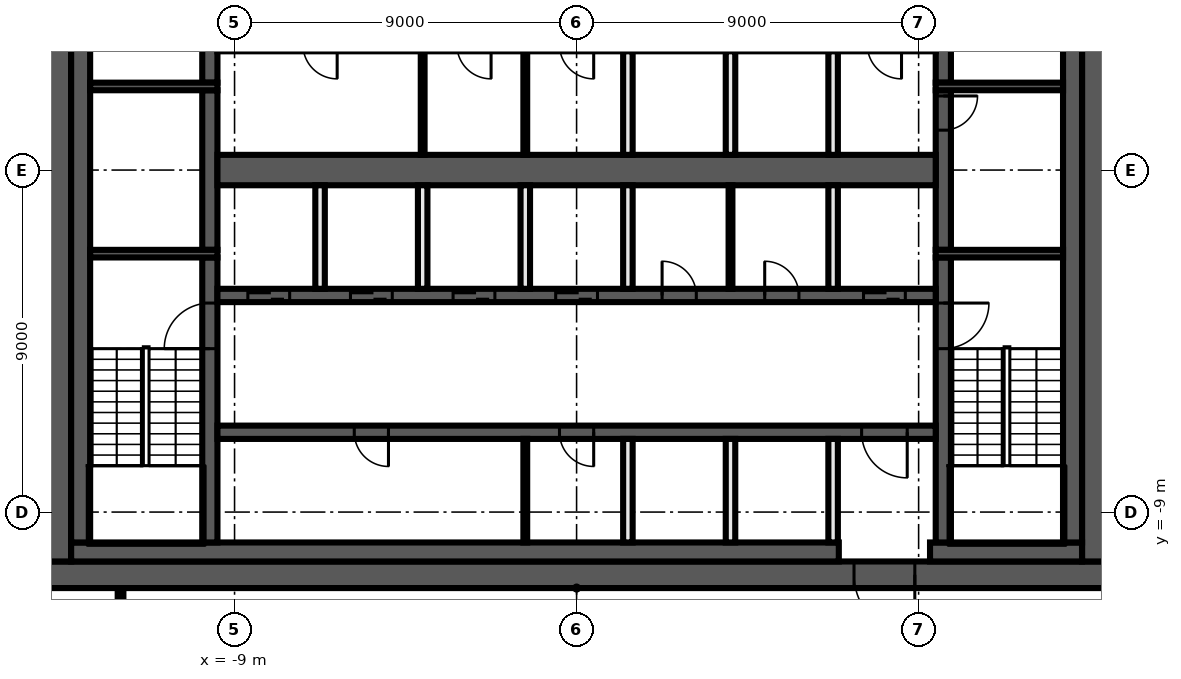
"""IFC4 building model, lengths in metres.
Left out: names, types, materials, properties, quantities, classifications, styles, units other than length and angle.
Written with IfcOpenShell. Run it as: python <this file> out.ifc"""

import sys

from ifc_helpers import new_model, si_unit, direction, frame, frame_2d, origin, place, context, subcontext, project, spatial, rectangle, extrude, element, fill, save


model = new_model("IFC4")
c1 = context("Model", 3, precision=1e-05, world=origin(), true_north=direction((0.0, 1.0)))
c2 = subcontext(c1, "Body", "Model", "MODEL_VIEW")
j1 = project(units=[si_unit("LENGTHUNIT", "METRE"), si_unit("PLANEANGLEUNIT", "RADIAN")], contexts=[c1])
p1 = place(None, origin())
s1 = spatial("IfcSite", under=j1, at=p1, CompositionType="ELEMENT")
p2 = place(p1, origin())
s2 = spatial("IfcBuilding", under=s1, at=p2, CompositionType="ELEMENT")
p3 = place(p2, frame((0.0, 0.0, 279.0)))
s3 = spatial("IfcBuildingStorey", under=s2, at=p3, CompositionType="ELEMENT", Elevation=279.0)
p4 = place(p3, frame((-12.0, -13.725, 0.0), z_axis=(0.0, 0.0, 1.0), x_axis=(0.0, 1.0, 0.0)))
e1 = element("IfcWall", 1, at=p4, inside=s3, PredefinedType="PARTITIONING", context=c2, shape_type="SweptSolid", body=[
    extrude(rectangle(XDim=2.725, YDim=0.15, at=frame_2d((1.363, 0.0))), origin(), (0.0, 0.0, 1.0), 3.6),
])
p5 = place(p3, frame((14.0, -10.65, 0.0), z_axis=(0.0, 0.0, 1.0), x_axis=(-1.0, 0.0, 0.0)))
e2 = element("IfcWall", 2, at=p5, inside=s3, PredefinedType="SHEAR", context=c2, shape_type="SweptSolid", body=[
    extrude(rectangle(XDim=28.0, YDim=0.7, at=frame_2d((14.0, 0.0))), origin(), (0.0, 0.0, 1.0), 3.6),
])
p6 = place(p5, frame((5.1, 0.0, 0.0)))
e3 = element("IfcOpeningElement", 3, at=p6, cuts=e2, PredefinedType="OPENING", context=c2, shape_type="SweptSolid", body=[
    extrude(rectangle(XDim=1.6, YDim=2.1, at=frame_2d((0.8, 1.05))), frame((0.0, 0.36, 0.0), z_axis=(0.0, -1.0, 0.0), x_axis=(1.0, 0.0, 0.0)), (0.0, 0.0, 1.0), 0.72),
])
for number, where, z_axis, x_axis in (
    (4, (13.65, 10.3, 0.0), (0.0, 0.0, 1.0), (0.0, -1.0, 0.0)),
    (5, (-13.65, -10.3, 0.0), (0.0, 0.0, 1.0), (0.0, 1.0, 0.0)),
):
    element("IfcWall", number, at=place(p3, frame(where, z_axis=z_axis, x_axis=x_axis)), inside=s3, PredefinedType="SHEAR", context=c2, shape_type="SweptSolid", body=[
        extrude(rectangle(XDim=20.6, YDim=0.7, at=frame_2d((10.3, 0.0))), origin(), (0.0, 0.0, 1.0), 3.6),
    ])
p7 = place(p3, frame((13.3, -10.05, 0.0), z_axis=(0.0, 0.0, 1.0), x_axis=(-1.0, 0.0, 0.0)))
e6 = element("IfcWall", 6, at=p7, inside=s3, PredefinedType="SHEAR", context=c2, shape_type="SweptSolid", body=[
    extrude(rectangle(XDim=4.0, YDim=0.5, at=frame_2d((2.0, 0.0))), origin(), (0.0, 0.0, 1.0), 3.6),
])
p8 = place(p3, frame((6.9, -10.05, 0.0), z_axis=(0.0, 0.0, 1.0), x_axis=(-1.0, 0.0, 0.0)))
e7 = element("IfcWall", 7, at=p8, inside=s3, PredefinedType="SHEAR", context=c2, shape_type="SweptSolid", body=[
    extrude(rectangle(XDim=20.2, YDim=0.5, at=frame_2d((10.1, 0.0))), origin(), (0.0, 0.0, 1.0), 3.6),
])
for number, where, z_axis, x_axis in (
    (8, (13.05, 9.8, 0.0), (0.0, 0.0, 1.0), (0.0, -1.0, 0.0)),
    (9, (-13.05, -9.8, 0.0), (0.0, 0.0, 1.0), (0.0, 1.0, 0.0)),
):
    element("IfcWall", number, at=place(p3, frame(where, z_axis=z_axis, x_axis=x_axis)), inside=s3, PredefinedType="SHEAR", context=c2, shape_type="SweptSolid", body=[
        extrude(rectangle(XDim=19.6, YDim=0.5, at=frame_2d((9.8, 0.0))), origin(), (0.0, 0.0, 1.0), 3.6),
    ])
p9 = place(p3, frame((9.65, -2.3, 0.0), z_axis=(0.0, 0.0, 1.0), x_axis=(0.0, -1.0, 0.0)))
e10 = element("IfcWall", 10, at=p9, inside=s3, PredefinedType="SHEAR", context=c2, shape_type="SweptSolid", body=[
    extrude(rectangle(XDim=7.5, YDim=0.4, at=frame_2d((3.75, 0.0))), origin(), (0.0, 0.0, 1.0), 3.6),
])
p10 = place(p9, frame((1.2, 0.0, 0.0)))
e11 = element("IfcOpeningElement", 11, at=p10, cuts=e10, PredefinedType="OPENING", context=c2, shape_type="SweptSolid", body=[
    extrude(rectangle(XDim=1.2, YDim=2.1, at=frame_2d((0.6, 1.05))), frame((0.0, 0.21, 0.0), z_axis=(0.0, -1.0, 0.0), x_axis=(1.0, 0.0, 0.0)), (0.0, 0.0, 1.0), 0.42),
])
p11 = place(p3, frame((9.65, 2.1, 0.0), z_axis=(0.0, 0.0, 1.0), x_axis=(0.0, -1.0, 0.0)))
e12 = element("IfcWall", 12, at=p11, inside=s3, PredefinedType="SHEAR", context=c2, shape_type="SweptSolid", body=[
    extrude(rectangle(XDim=4.2, YDim=0.4, at=frame_2d((2.1, 0.0))), origin(), (0.0, 0.0, 1.0), 3.6),
])
p12 = place(p11, frame((0.15, 0.0, 0.0)))
e13 = element("IfcOpeningElement", 13, at=p12, cuts=e12, PredefinedType="OPENING", context=c2, shape_type="SweptSolid", body=[
    extrude(rectangle(XDim=0.9, YDim=2.1, at=frame_2d((0.45, 1.05))), frame((0.0, 0.21, 0.0), z_axis=(0.0, -1.0, 0.0), x_axis=(1.0, 0.0, 0.0)), (0.0, 0.0, 1.0), 0.42),
])
p13 = place(p3, frame((9.65, 9.8, 0.0), z_axis=(0.0, 0.0, 1.0), x_axis=(0.0, -1.0, 0.0)))
e14 = element("IfcWall", 14, at=p13, inside=s3, PredefinedType="SHEAR", context=c2, shape_type="SweptSolid", body=[
    extrude(rectangle(XDim=7.5, YDim=0.4, at=frame_2d((3.75, 0.0))), origin(), (0.0, 0.0, 1.0), 3.6),
])
p14 = place(p13, frame((5.1, 0.0, 0.0)))
e15 = element("IfcOpeningElement", 15, at=p14, cuts=e14, PredefinedType="OPENING", context=c2, shape_type="SweptSolid", body=[
    extrude(rectangle(XDim=1.2, YDim=2.1, at=frame_2d((0.6, 1.05))), frame((0.0, 0.21, 0.0), z_axis=(0.0, -1.0, 0.0), x_axis=(1.0, 0.0, 0.0)), (0.0, 0.0, 1.0), 0.42),
])
p15 = place(p3, frame((-9.65, -9.8, 0.0), z_axis=(0.0, 0.0, 1.0), x_axis=(0.0, 1.0, 0.0)))
e16 = element("IfcWall", 16, at=p15, inside=s3, PredefinedType="SHEAR", context=c2, shape_type="SweptSolid", body=[
    extrude(rectangle(XDim=7.5, YDim=0.4, at=frame_2d((3.75, 0.0))), origin(), (0.0, 0.0, 1.0), 3.6),
])
p16 = place(p15, frame((5.1, 0.0, 0.0)))
e17 = element("IfcOpeningElement", 17, at=p16, cuts=e16, PredefinedType="OPENING", context=c2, shape_type="SweptSolid", body=[
    extrude(rectangle(XDim=1.2, YDim=2.1, at=frame_2d((0.6, 1.05))), frame((0.0, 0.21, 0.0), z_axis=(0.0, -1.0, 0.0), x_axis=(1.0, 0.0, 0.0)), (0.0, 0.0, 1.0), 0.42),
])
p17 = place(p3, frame((-9.65, -2.1, 0.0), z_axis=(0.0, 0.0, 1.0), x_axis=(0.0, 1.0, 0.0)))
e18 = element("IfcWall", 18, at=p17, inside=s3, PredefinedType="SHEAR", context=c2, shape_type="SweptSolid", body=[
    extrude(rectangle(XDim=4.2, YDim=0.4, at=frame_2d((2.1, 0.0))), origin(), (0.0, 0.0, 1.0), 3.6),
])
p18 = place(p3, frame((-9.65, 2.3, 0.0), z_axis=(0.0, 0.0, 1.0), x_axis=(0.0, 1.0, 0.0)))
e19 = element("IfcWall", 19, at=p18, inside=s3, PredefinedType="SHEAR", context=c2, shape_type="SweptSolid", body=[
    extrude(rectangle(XDim=7.5, YDim=0.4, at=frame_2d((3.75, 0.0))), origin(), (0.0, 0.0, 1.0), 3.6),
])
p19 = place(p18, frame((1.2, 0.0, 0.0)))
e20 = element("IfcOpeningElement", 20, at=p19, cuts=e19, PredefinedType="OPENING", context=c2, shape_type="SweptSolid", body=[
    extrude(rectangle(XDim=1.2, YDim=2.1, at=frame_2d((0.6, 1.05))), frame((0.0, 0.21, 0.0), z_axis=(0.0, -1.0, 0.0), x_axis=(1.0, 0.0, 0.0)), (0.0, 0.0, 1.0), 0.42),
])
for number, where, z_axis, x_axis in (
    (21, (9.45, 2.2, 0.0), (0.0, 0.0, 1.0), (1.0, 0.0, 0.0)),
    (22, (-9.45, 2.2, 0.0), (0.0, 0.0, 1.0), (-1.0, 0.0, 0.0)),
    (23, (9.45, -2.2, 0.0), (0.0, 0.0, 1.0), (1.0, 0.0, 0.0)),
    (24, (-9.45, -2.2, 0.0), (0.0, 0.0, 1.0), (-1.0, 0.0, 0.0)),
):
    element("IfcWall", number, at=place(p3, frame(where, z_axis=z_axis, x_axis=x_axis)), inside=s3, PredefinedType="SHEAR", context=c2, shape_type="SweptSolid", body=[
        extrude(rectangle(XDim=3.35, YDim=0.2, at=frame_2d((1.675, 0.0))), origin(), (0.0, 0.0, 1.0), 3.6),
    ])
p20 = place(p3, frame((-9.45, -3.3, 0.0), z_axis=(0.0, 0.0, 1.0), x_axis=(1.0, 0.0, 0.0)))
e25 = element("IfcWall", 25, at=p20, inside=s3, PredefinedType="SHEAR", context=c2, shape_type="SweptSolid", body=[
    extrude(rectangle(XDim=18.9, YDim=0.35, at=frame_2d((9.45, 0.0))), origin(), (0.0, 0.0, 1.0), 3.6),
])
p21 = place(p20, frame((0.8, 0.0, 0.0)))
e26 = element("IfcOpeningElement", 26, at=p21, cuts=e25, PredefinedType="OPENING", context=c2, shape_type="SweptSolid", body=[
    extrude(rectangle(XDim=1.1, YDim=2.1, at=frame_2d((0.55, 1.05))), frame((0.0, 0.185, 0.0), z_axis=(0.0, -1.0, 0.0), x_axis=(1.0, 0.0, 0.0)), (0.0, 0.0, 1.0), 0.37),
])
p22 = place(p20, frame((3.5, 0.0, 0.0)))
e27 = element("IfcOpeningElement", 27, at=p22, cuts=e25, PredefinedType="OPENING", context=c2, shape_type="SweptSolid", body=[
    extrude(rectangle(XDim=1.1, YDim=2.1, at=frame_2d((0.55, 1.05))), frame((0.0, 0.185, 0.0), z_axis=(0.0, -1.0, 0.0), x_axis=(1.0, 0.0, 0.0)), (0.0, 0.0, 1.0), 0.37),
])
p23 = place(p20, frame((6.2, 0.0, 0.0)))
e28 = element("IfcOpeningElement", 28, at=p23, cuts=e25, PredefinedType="OPENING", context=c2, shape_type="SweptSolid", body=[
    extrude(rectangle(XDim=1.1, YDim=2.1, at=frame_2d((0.55, 1.05))), frame((0.0, 0.185, 0.0), z_axis=(0.0, -1.0, 0.0), x_axis=(1.0, 0.0, 0.0)), (0.0, 0.0, 1.0), 0.37),
])
p24 = place(p20, frame((8.9, 0.0, 0.0)))
e29 = element("IfcOpeningElement", 29, at=p24, cuts=e25, PredefinedType="OPENING", context=c2, shape_type="SweptSolid", body=[
    extrude(rectangle(XDim=1.1, YDim=2.1, at=frame_2d((0.55, 1.05))), frame((0.0, 0.185, 0.0), z_axis=(0.0, -1.0, 0.0), x_axis=(1.0, 0.0, 0.0)), (0.0, 0.0, 1.0), 0.37),
])
p25 = place(p20, frame((17.0, 0.0, 0.0)))
e30 = element("IfcOpeningElement", 30, at=p25, cuts=e25, PredefinedType="OPENING", context=c2, shape_type="SweptSolid", body=[
    extrude(rectangle(XDim=1.1, YDim=2.1, at=frame_2d((0.55, 1.05))), frame((0.0, 0.185, 0.0), z_axis=(0.0, -1.0, 0.0), x_axis=(1.0, 0.0, 0.0)), (0.0, 0.0, 1.0), 0.37),
])
p26 = place(p20, frame((11.7, 0.0, 0.0)))
e31 = element("IfcOpeningElement", 31, at=p26, cuts=e25, PredefinedType="OPENING", context=c2, shape_type="SweptSolid", body=[
    extrude(rectangle(XDim=0.9, YDim=2.1, at=frame_2d((0.45, 1.05))), frame((0.0, 0.185, 0.0), z_axis=(0.0, -1.0, 0.0), x_axis=(1.0, 0.0, 0.0)), (0.0, 0.0, 1.0), 0.37),
])
p27 = place(p20, frame((14.4, 0.0, 0.0)))
e32 = element("IfcOpeningElement", 32, at=p27, cuts=e25, PredefinedType="OPENING", context=c2, shape_type="SweptSolid", body=[
    extrude(rectangle(XDim=0.9, YDim=2.1, at=frame_2d((0.45, 1.05))), frame((0.0, 0.185, 0.0), z_axis=(0.0, -1.0, 0.0), x_axis=(1.0, 0.0, 0.0)), (0.0, 0.0, 1.0), 0.37),
])
p28 = place(p3, frame((9.45, -6.9, 0.0), z_axis=(0.0, 0.0, 1.0), x_axis=(-1.0, 0.0, 0.0)))
e33 = element("IfcWall", 33, at=p28, inside=s3, PredefinedType="SHEAR", context=c2, shape_type="SweptSolid", body=[
    extrude(rectangle(XDim=18.9, YDim=0.35, at=frame_2d((9.45, 0.0))), origin(), (0.0, 0.0, 1.0), 3.6),
])
p29 = place(p28, frame((0.75, 0.0, 0.0)))
e34 = element("IfcOpeningElement", 34, at=p29, cuts=e33, PredefinedType="OPENING", context=c2, shape_type="SweptSolid", body=[
    extrude(rectangle(XDim=1.2, YDim=2.1, at=frame_2d((0.6, 1.05))), frame((0.0, 0.185, 0.0), z_axis=(0.0, -1.0, 0.0), x_axis=(1.0, 0.0, 0.0)), (0.0, 0.0, 1.0), 0.37),
])
p30 = place(p28, frame((14.4, 0.0, 0.0)))
e35 = element("IfcOpeningElement", 35, at=p30, cuts=e33, PredefinedType="OPENING", context=c2, shape_type="SweptSolid", body=[
    extrude(rectangle(XDim=0.9, YDim=2.1, at=frame_2d((0.45, 1.05))), frame((0.0, 0.185, 0.0), z_axis=(0.0, -1.0, 0.0), x_axis=(1.0, 0.0, 0.0)), (0.0, 0.0, 1.0), 0.37),
])
p31 = place(p28, frame((9.0, 0.0, 0.0)))
e36 = element("IfcOpeningElement", 36, at=p31, cuts=e33, PredefinedType="OPENING", context=c2, shape_type="SweptSolid", body=[
    extrude(rectangle(XDim=0.9, YDim=2.1, at=frame_2d((0.45, 1.05))), frame((0.0, 0.185, 0.0), z_axis=(0.0, -1.0, 0.0), x_axis=(1.0, 0.0, 0.0)), (0.0, 0.0, 1.0), 0.37),
])
p32 = place(p3, frame((-9.45, 0.0, 0.0), z_axis=(0.0, 0.0, 1.0), x_axis=(1.0, 0.0, 0.0)))
e37 = element("IfcWall", 37, at=p32, inside=s3, PredefinedType="SHEAR", context=c2, shape_type="SweptSolid", body=[
    extrude(rectangle(XDim=18.9, YDim=0.8, at=frame_2d((9.45, 0.0))), origin(), (0.0, 0.0, 1.0), 3.6),
])
for number, where, z_axis, x_axis in (
    (38, (6.75, -9.8, 0.0), (0.0, 0.0, 1.0), (0.0, 1.0, 0.0)),
    (39, (6.75, -3.125, 0.0), (0.0, 0.0, 1.0), (0.0, 1.0, 0.0)),
    (40, (6.75, 0.4, 0.0), (0.0, 0.0, 1.0), (0.0, 1.0, 0.0)),
):
    element("IfcWall", number, at=place(p3, frame(where, z_axis=z_axis, x_axis=x_axis)), inside=s3, PredefinedType="SOLIDWALL", context=c2, shape_type="SweptSolid", body=[
        extrude(rectangle(XDim=2.725, YDim=0.25, at=frame_2d((1.363, 0.0))), origin(), (0.0, 0.0, 1.0), 3.6),
    ])
p33 = place(p3, frame((4.05, -3.125, 0.0), z_axis=(0.0, 0.0, 1.0), x_axis=(0.0, 1.0, 0.0)))
e41 = element("IfcWall", 41, at=p33, inside=s3, PredefinedType="PARTITIONING", context=c2, shape_type="SweptSolid", body=[
    extrude(rectangle(XDim=2.725, YDim=0.1, at=frame_2d((1.363, 0.0))), origin(), (0.0, 0.0, 1.0), 3.6),
])
for number, where, z_axis, x_axis in (
    (42, (4.05, -9.8, 0.0), (0.0, 0.0, 1.0), (0.0, 1.0, 0.0)),
    (43, (4.05, 0.4, 0.0), (0.0, 0.0, 1.0), (0.0, 1.0, 0.0)),
    (44, (1.35, -9.8, 0.0), (0.0, 0.0, 1.0), (0.0, 1.0, 0.0)),
    (45, (1.35, -3.125, 0.0), (0.0, 0.0, 1.0), (0.0, 1.0, 0.0)),
    (46, (1.35, 0.4, 0.0), (0.0, 0.0, 1.0), (0.0, 1.0, 0.0)),
):
    element("IfcWall", number, at=place(p3, frame(where, z_axis=z_axis, x_axis=x_axis)), inside=s3, PredefinedType="SOLIDWALL", context=c2, shape_type="SweptSolid", body=[
        extrude(rectangle(XDim=2.725, YDim=0.25, at=frame_2d((1.363, 0.0))), origin(), (0.0, 0.0, 1.0), 3.6),
    ])
for number, where, z_axis, x_axis in (
    (47, (-1.35, -9.8, 0.0), (0.0, 0.0, 1.0), (0.0, 1.0, 0.0)),
    (48, (-1.35, 0.4, 0.0), (0.0, 0.0, 1.0), (0.0, 1.0, 0.0)),
):
    element("IfcWall", number, at=place(p3, frame(where, z_axis=z_axis, x_axis=x_axis)), inside=s3, PredefinedType="PARTITIONING", context=c2, shape_type="SweptSolid", body=[
        extrude(rectangle(XDim=2.725, YDim=0.1, at=frame_2d((1.363, 0.0))), origin(), (0.0, 0.0, 1.0), 3.6),
    ])
p34 = place(p3, frame((-1.35, -3.125, 0.0), z_axis=(0.0, 0.0, 1.0), x_axis=(0.0, 1.0, 0.0)))
e49 = element("IfcWall", 49, at=p34, inside=s3, PredefinedType="SOLIDWALL", context=c2, shape_type="SweptSolid", body=[
    extrude(rectangle(XDim=2.725, YDim=0.25, at=frame_2d((1.363, 0.0))), origin(), (0.0, 0.0, 1.0), 3.6),
])
p35 = place(p3, frame((-4.05, 0.4, 0.0), z_axis=(0.0, 0.0, 1.0), x_axis=(0.0, 1.0, 0.0)))
e50 = element("IfcWall", 50, at=p35, inside=s3, PredefinedType="PARTITIONING", context=c2, shape_type="SweptSolid", body=[
    extrude(rectangle(XDim=2.725, YDim=0.1, at=frame_2d((1.363, 0.0))), origin(), (0.0, 0.0, 1.0), 3.6),
])
for number, where, z_axis, x_axis in (
    (51, (-4.05, -3.125, 0.0), (0.0, 0.0, 1.0), (0.0, 1.0, 0.0)),
    (52, (-6.75, -3.125, 0.0), (0.0, 0.0, 1.0), (0.0, 1.0, 0.0)),
):
    element("IfcWall", number, at=place(p3, frame(where, z_axis=z_axis, x_axis=x_axis)), inside=s3, PredefinedType="SOLIDWALL", context=c2, shape_type="SweptSolid", body=[
        extrude(rectangle(XDim=2.725, YDim=0.25, at=frame_2d((1.363, 0.0))), origin(), (0.0, 0.0, 1.0), 3.6),
    ])
p36 = place(p12, origin())
e53 = element("IfcDoor", 53, at=p36, inside=s3, OperationType="SINGLE_SWING_RIGHT", PredefinedType="DOOR", context=c2, shape_type="SweptSolid", body=[
    extrude(rectangle(XDim=0.9, YDim=2.1, at=frame_2d((0.45, 1.05))), frame((0.0, 0.025, 0.0), z_axis=(0.0, -1.0, 0.0), x_axis=(1.0, 0.0, 0.0)), (0.0, 0.0, 1.0), 0.05),
])
fill(e13, e53)
p37 = place(p21, origin())
e54 = element("IfcDoor", 54, at=p37, inside=s3, OperationType="DOUBLE_DOOR_SLIDING", PredefinedType="DOOR", context=c2, shape_type="SweptSolid", body=[
    extrude(rectangle(XDim=1.1, YDim=2.1, at=frame_2d((0.55, 1.05))), frame((0.0, 0.025, 0.0), z_axis=(0.0, -1.0, 0.0), x_axis=(1.0, 0.0, 0.0)), (0.0, 0.0, 1.0), 0.05),
])
fill(e26, e54)
p38 = place(p22, origin())
e55 = element("IfcDoor", 55, at=p38, inside=s3, OperationType="DOUBLE_DOOR_SLIDING", PredefinedType="DOOR", context=c2, shape_type="SweptSolid", body=[
    extrude(rectangle(XDim=1.1, YDim=2.1, at=frame_2d((0.55, 1.05))), frame((0.0, 0.025, 0.0), z_axis=(0.0, -1.0, 0.0), x_axis=(1.0, 0.0, 0.0)), (0.0, 0.0, 1.0), 0.05),
])
fill(e27, e55)
p39 = place(p23, origin())
e56 = element("IfcDoor", 56, at=p39, inside=s3, OperationType="DOUBLE_DOOR_SLIDING", PredefinedType="DOOR", context=c2, shape_type="SweptSolid", body=[
    extrude(rectangle(XDim=1.1, YDim=2.1, at=frame_2d((0.55, 1.05))), frame((0.0, 0.025, 0.0), z_axis=(0.0, -1.0, 0.0), x_axis=(1.0, 0.0, 0.0)), (0.0, 0.0, 1.0), 0.05),
])
fill(e28, e56)
p40 = place(p24, origin())
e57 = element("IfcDoor", 57, at=p40, inside=s3, OperationType="DOUBLE_DOOR_SLIDING", PredefinedType="DOOR", context=c2, shape_type="SweptSolid", body=[
    extrude(rectangle(XDim=1.1, YDim=2.1, at=frame_2d((0.55, 1.05))), frame((0.0, 0.025, 0.0), z_axis=(0.0, -1.0, 0.0), x_axis=(1.0, 0.0, 0.0)), (0.0, 0.0, 1.0), 0.05),
])
fill(e29, e57)
p41 = place(p25, origin())
e58 = element("IfcDoor", 58, at=p41, inside=s3, OperationType="DOUBLE_DOOR_SLIDING", PredefinedType="DOOR", context=c2, shape_type="SweptSolid", body=[
    extrude(rectangle(XDim=1.1, YDim=2.1, at=frame_2d((0.55, 1.05))), frame((0.0, 0.025, 0.0), z_axis=(0.0, -1.0, 0.0), x_axis=(1.0, 0.0, 0.0)), (0.0, 0.0, 1.0), 0.05),
])
fill(e30, e58)
p42 = place(p6, origin())
e59 = element("IfcDoor", 59, at=p42, inside=s3, OperationType="DOUBLE_DOOR_SINGLE_SWING", PredefinedType="DOOR", context=c2, shape_type="SweptSolid", body=[
    extrude(rectangle(XDim=1.6, YDim=2.1, at=frame_2d((0.8, 1.05))), frame((0.0, 0.025, 0.0), z_axis=(0.0, -1.0, 0.0), x_axis=(1.0, 0.0, 0.0)), (0.0, 0.0, 1.0), 0.05),
])
fill(e3, e59)
p43 = place(p29, origin())
e60 = element("IfcDoor", 60, at=p43, inside=s3, OperationType="SINGLE_SWING_LEFT", PredefinedType="DOOR", context=c2, shape_type="SweptSolid", body=[
    extrude(rectangle(XDim=1.2, YDim=2.1, at=frame_2d((0.6, 1.05))), frame((0.0, 0.025, 0.0), z_axis=(0.0, -1.0, 0.0), x_axis=(1.0, 0.0, 0.0)), (0.0, 0.0, 1.0), 0.05),
])
fill(e34, e60)
p44 = place(p26, origin())
e61 = element("IfcDoor", 61, at=p44, inside=s3, OperationType="SINGLE_SWING_RIGHT", PredefinedType="DOOR", context=c2, shape_type="SweptSolid", body=[
    extrude(rectangle(XDim=0.9, YDim=2.1, at=frame_2d((0.45, 1.05))), frame((0.0, 0.025, 0.0), z_axis=(0.0, -1.0, 0.0), x_axis=(1.0, 0.0, 0.0)), (0.0, 0.0, 1.0), 0.05),
])
fill(e31, e61)
p45 = place(p27, origin())
e62 = element("IfcDoor", 62, at=p45, inside=s3, OperationType="SINGLE_SWING_LEFT", PredefinedType="DOOR", context=c2, shape_type="SweptSolid", body=[
    extrude(rectangle(XDim=0.9, YDim=2.1, at=frame_2d((0.45, 1.05))), frame((0.0, 0.025, 0.0), z_axis=(0.0, -1.0, 0.0), x_axis=(1.0, 0.0, 0.0)), (0.0, 0.0, 1.0), 0.05),
])
fill(e32, e62)
p46 = place(p30, origin())
e63 = element("IfcDoor", 63, at=p46, inside=s3, OperationType="SINGLE_SWING_RIGHT", PredefinedType="DOOR", context=c2, shape_type="SweptSolid", body=[
    extrude(rectangle(XDim=0.9, YDim=2.1, at=frame_2d((0.45, 1.05))), frame((0.0, 0.025, 0.0), z_axis=(0.0, -1.0, 0.0), x_axis=(1.0, 0.0, 0.0)), (0.0, 0.0, 1.0), 0.05),
])
fill(e35, e63)
p47 = place(p31, origin())
e64 = element("IfcDoor", 64, at=p47, inside=s3, OperationType="SINGLE_SWING_LEFT", PredefinedType="DOOR", context=c2, shape_type="SweptSolid", body=[
    extrude(rectangle(XDim=0.9, YDim=2.1, at=frame_2d((0.45, 1.05))), frame((0.0, 0.025, 0.0), z_axis=(0.0, -1.0, 0.0), x_axis=(1.0, 0.0, 0.0)), (0.0, 0.0, 1.0), 0.05),
])
fill(e36, e64)
p48 = place(p10, origin())
e65 = element("IfcDoor", 65, at=p48, inside=s3, OperationType="SINGLE_SWING_RIGHT", PredefinedType="DOOR", context=c2, shape_type="SweptSolid", body=[
    extrude(rectangle(XDim=1.2, YDim=2.1, at=frame_2d((0.6, 1.05))), frame((0.0, 0.025, 0.0), z_axis=(0.0, -1.0, 0.0), x_axis=(1.0, 0.0, 0.0)), (0.0, 0.0, 1.0), 0.05),
])
fill(e11, e65)
p49 = place(p16, origin())
e66 = element("IfcDoor", 66, at=p49, inside=s3, OperationType="SINGLE_SWING_LEFT", PredefinedType="DOOR", context=c2, shape_type="SweptSolid", body=[
    extrude(rectangle(XDim=1.2, YDim=2.1, at=frame_2d((0.6, 1.05))), frame((0.0, 0.025, 0.0), z_axis=(0.0, -1.0, 0.0), x_axis=(1.0, 0.0, 0.0)), (0.0, 0.0, 1.0), 0.05),
])
fill(e17, e66)
save(model, sys.argv[1])
